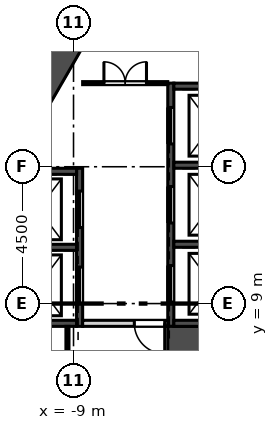
"""IFC4 building model, lengths in metres.
Left out: names, types, materials, properties, quantities, classifications, styles, units other than length and angle.
Written with IfcOpenShell. Run it as: python <this file> out.ifc"""

import sys

from ifc_helpers import new_model, si_unit, direction, frame, frame_2d, origin, place, context, subcontext, project, spatial, rectangle, extrude, element, fill, save


model = new_model("IFC4")
c1 = context("Model", 3, precision=1e-05, world=origin(), true_north=direction((0.0, 1.0)))
c2 = subcontext(c1, "Body", "Model", "MODEL_VIEW")
j1 = project(units=[si_unit("LENGTHUNIT", "METRE"), si_unit("PLANEANGLEUNIT", "RADIAN")], contexts=[c1])
p1 = place(None, origin())
s1 = spatial("IfcSite", under=j1, at=p1, CompositionType="ELEMENT")
p2 = place(p1, origin())
s2 = spatial("IfcBuilding", under=s1, at=p2, CompositionType="ELEMENT")
p3 = place(p2, frame((0.0, 0.0, 14.0)))
s3 = spatial("IfcBuildingStorey", under=s2, at=p3, CompositionType="ELEMENT", Elevation=14.0)
p4 = place(p3, frame((-8.805, 18.65, 0.0), z_axis=(0.0, 0.0, 1.0), x_axis=(-0.50000187635, -0.866024320471, 0.0)))
e1 = element("IfcWall", 1, at=p4, inside=s3, PredefinedType="SHEAR", context=c2, shape_type="SweptSolid", body=[
    extrude(rectangle(XDim=9.177, YDim=1.4, at=frame_2d((4.588, 0.0))), origin(), (0.0, 0.0, 1.0), 6.0),
])
p5 = place(p3, frame((-4.853, 74.393, 0.0), z_axis=(0.0, 0.0, 1.0), x_axis=(-0.49999894854, -0.866026010844, 0.0)))
e2 = element("IfcWall", 2, at=p5, inside=s3, PredefinedType="SOLIDWALL", context=c2, shape_type="SweptSolid", body=[
    extrude(rectangle(XDim=76.0, YDim=0.34, at=frame_2d((38.0, 0.0))), origin(), (0.0, 0.0, 1.0), 5.7),
])
p6 = place(p5, frame((1.058, 0.0, 0.9)))
e3 = element("IfcOpeningElement", 3, at=p6, cuts=e2, PredefinedType="OPENING", context=c2, shape_type="SweptSolid", body=[
    extrude(rectangle(XDim=1.885, YDim=3.5, at=frame_2d((0.942, 1.75))), frame((0.0, 0.18, 0.0), z_axis=(0.0, -1.0, 0.0), x_axis=(1.0, 0.0, 0.0)), (0.0, 0.0, 1.0), 0.36),
])
p7 = place(p5, frame((4.058, 0.0, 0.9)))
e4 = element("IfcOpeningElement", 4, at=p7, cuts=e2, PredefinedType="OPENING", context=c2, shape_type="SweptSolid", body=[
    extrude(rectangle(XDim=1.885, YDim=3.5, at=frame_2d((0.942, 1.75))), frame((0.0, 0.18, 0.0), z_axis=(0.0, -1.0, 0.0), x_axis=(1.0, 0.0, 0.0)), (0.0, 0.0, 1.0), 0.36),
])
p8 = place(p5, frame((7.058, 0.0, 0.9)))
e5 = element("IfcOpeningElement", 5, at=p8, cuts=e2, PredefinedType="OPENING", context=c2, shape_type="SweptSolid", body=[
    extrude(rectangle(XDim=1.885, YDim=3.5, at=frame_2d((0.942, 1.75))), frame((0.0, 0.18, 0.0), z_axis=(0.0, -1.0, 0.0), x_axis=(1.0, 0.0, 0.0)), (0.0, 0.0, 1.0), 0.36),
])
p9 = place(p5, frame((10.058, 0.0, 0.9)))
e6 = element("IfcOpeningElement", 6, at=p9, cuts=e2, PredefinedType="OPENING", context=c2, shape_type="SweptSolid", body=[
    extrude(rectangle(XDim=1.885, YDim=3.5, at=frame_2d((0.942, 1.75))), frame((0.0, 0.18, 0.0), z_axis=(0.0, -1.0, 0.0), x_axis=(1.0, 0.0, 0.0)), (0.0, 0.0, 1.0), 0.36),
])
p10 = place(p5, frame((13.058, 0.0, 0.9)))
e7 = element("IfcOpeningElement", 7, at=p10, cuts=e2, PredefinedType="OPENING", context=c2, shape_type="SweptSolid", body=[
    extrude(rectangle(XDim=1.885, YDim=3.5, at=frame_2d((0.942, 1.75))), frame((0.0, 0.18, 0.0), z_axis=(0.0, -1.0, 0.0), x_axis=(1.0, 0.0, 0.0)), (0.0, 0.0, 1.0), 0.36),
])
p11 = place(p5, frame((16.058, 0.0, 0.9)))
e8 = element("IfcOpeningElement", 8, at=p11, cuts=e2, PredefinedType="OPENING", context=c2, shape_type="SweptSolid", body=[
    extrude(rectangle(XDim=1.885, YDim=3.5, at=frame_2d((0.942, 1.75))), frame((0.0, 0.18, 0.0), z_axis=(0.0, -1.0, 0.0), x_axis=(1.0, 0.0, 0.0)), (0.0, 0.0, 1.0), 0.36),
])
p12 = place(p5, frame((19.058, 0.0, 0.9)))
e9 = element("IfcOpeningElement", 9, at=p12, cuts=e2, PredefinedType="OPENING", context=c2, shape_type="SweptSolid", body=[
    extrude(rectangle(XDim=1.885, YDim=3.5, at=frame_2d((0.942, 1.75))), frame((0.0, 0.18, 0.0), z_axis=(0.0, -1.0, 0.0), x_axis=(1.0, 0.0, 0.0)), (0.0, 0.0, 1.0), 0.36),
])
p13 = place(p5, frame((22.058, 0.0, 0.9)))
e10 = element("IfcOpeningElement", 10, at=p13, cuts=e2, PredefinedType="OPENING", context=c2, shape_type="SweptSolid", body=[
    extrude(rectangle(XDim=1.885, YDim=3.5, at=frame_2d((0.942, 1.75))), frame((0.0, 0.18, 0.0), z_axis=(0.0, -1.0, 0.0), x_axis=(1.0, 0.0, 0.0)), (0.0, 0.0, 1.0), 0.36),
])
p14 = place(p5, frame((25.058, 0.0, 0.9)))
e11 = element("IfcOpeningElement", 11, at=p14, cuts=e2, PredefinedType="OPENING", context=c2, shape_type="SweptSolid", body=[
    extrude(rectangle(XDim=1.885, YDim=3.5, at=frame_2d((0.942, 1.75))), frame((0.0, 0.18, 0.0), z_axis=(0.0, -1.0, 0.0), x_axis=(1.0, 0.0, 0.0)), (0.0, 0.0, 1.0), 0.36),
])
p15 = place(p5, frame((28.058, 0.0, 0.9)))
e12 = element("IfcOpeningElement", 12, at=p15, cuts=e2, PredefinedType="OPENING", context=c2, shape_type="SweptSolid", body=[
    extrude(rectangle(XDim=1.885, YDim=3.5, at=frame_2d((0.942, 1.75))), frame((0.0, 0.18, 0.0), z_axis=(0.0, -1.0, 0.0), x_axis=(1.0, 0.0, 0.0)), (0.0, 0.0, 1.0), 0.36),
])
p16 = place(p5, frame((31.058, 0.0, 0.9)))
e13 = element("IfcOpeningElement", 13, at=p16, cuts=e2, PredefinedType="OPENING", context=c2, shape_type="SweptSolid", body=[
    extrude(rectangle(XDim=1.885, YDim=3.5, at=frame_2d((0.942, 1.75))), frame((0.0, 0.18, 0.0), z_axis=(0.0, -1.0, 0.0), x_axis=(1.0, 0.0, 0.0)), (0.0, 0.0, 1.0), 0.36),
])
p17 = place(p5, frame((34.058, 0.0, 0.9)))
e14 = element("IfcOpeningElement", 14, at=p17, cuts=e2, PredefinedType="OPENING", context=c2, shape_type="SweptSolid", body=[
    extrude(rectangle(XDim=1.885, YDim=3.5, at=frame_2d((0.942, 1.75))), frame((0.0, 0.18, 0.0), z_axis=(0.0, -1.0, 0.0), x_axis=(1.0, 0.0, 0.0)), (0.0, 0.0, 1.0), 0.36),
])
p18 = place(p5, frame((37.058, 0.0, 0.9)))
e15 = element("IfcOpeningElement", 15, at=p18, cuts=e2, PredefinedType="OPENING", context=c2, shape_type="SweptSolid", body=[
    extrude(rectangle(XDim=1.885, YDim=3.5, at=frame_2d((0.942, 1.75))), frame((0.0, 0.18, 0.0), z_axis=(0.0, -1.0, 0.0), x_axis=(1.0, 0.0, 0.0)), (0.0, 0.0, 1.0), 0.36),
])
p19 = place(p5, frame((40.058, 0.0, 0.9)))
e16 = element("IfcOpeningElement", 16, at=p19, cuts=e2, PredefinedType="OPENING", context=c2, shape_type="SweptSolid", body=[
    extrude(rectangle(XDim=1.885, YDim=3.5, at=frame_2d((0.942, 1.75))), frame((0.0, 0.18, 0.0), z_axis=(0.0, -1.0, 0.0), x_axis=(1.0, 0.0, 0.0)), (0.0, 0.0, 1.0), 0.36),
])
p20 = place(p5, frame((43.058, 0.0, 0.9)))
e17 = element("IfcOpeningElement", 17, at=p20, cuts=e2, PredefinedType="OPENING", context=c2, shape_type="SweptSolid", body=[
    extrude(rectangle(XDim=1.885, YDim=3.5, at=frame_2d((0.942, 1.75))), frame((0.0, 0.18, 0.0), z_axis=(0.0, -1.0, 0.0), x_axis=(1.0, 0.0, 0.0)), (0.0, 0.0, 1.0), 0.36),
])
p21 = place(p5, frame((46.058, 0.0, 0.9)))
e18 = element("IfcOpeningElement", 18, at=p21, cuts=e2, PredefinedType="OPENING", context=c2, shape_type="SweptSolid", body=[
    extrude(rectangle(XDim=1.885, YDim=3.5, at=frame_2d((0.942, 1.75))), frame((0.0, 0.18, 0.0), z_axis=(0.0, -1.0, 0.0), x_axis=(1.0, 0.0, 0.0)), (0.0, 0.0, 1.0), 0.36),
])
p22 = place(p5, frame((49.058, 0.0, 0.9)))
e19 = element("IfcOpeningElement", 19, at=p22, cuts=e2, PredefinedType="OPENING", context=c2, shape_type="SweptSolid", body=[
    extrude(rectangle(XDim=1.885, YDim=3.5, at=frame_2d((0.942, 1.75))), frame((0.0, 0.18, 0.0), z_axis=(0.0, -1.0, 0.0), x_axis=(1.0, 0.0, 0.0)), (0.0, 0.0, 1.0), 0.36),
])
p23 = place(p5, frame((52.058, 0.0, 0.9)))
e20 = element("IfcOpeningElement", 20, at=p23, cuts=e2, PredefinedType="OPENING", context=c2, shape_type="SweptSolid", body=[
    extrude(rectangle(XDim=1.885, YDim=3.5, at=frame_2d((0.942, 1.75))), frame((0.0, 0.18, 0.0), z_axis=(0.0, -1.0, 0.0), x_axis=(1.0, 0.0, 0.0)), (0.0, 0.0, 1.0), 0.36),
])
p24 = place(p5, frame((55.058, 0.0, 0.9)))
e21 = element("IfcOpeningElement", 21, at=p24, cuts=e2, PredefinedType="OPENING", context=c2, shape_type="SweptSolid", body=[
    extrude(rectangle(XDim=1.885, YDim=3.5, at=frame_2d((0.942, 1.75))), frame((0.0, 0.18, 0.0), z_axis=(0.0, -1.0, 0.0), x_axis=(1.0, 0.0, 0.0)), (0.0, 0.0, 1.0), 0.36),
])
p25 = place(p5, frame((58.058, 0.0, 0.9)))
e22 = element("IfcOpeningElement", 22, at=p25, cuts=e2, PredefinedType="OPENING", context=c2, shape_type="SweptSolid", body=[
    extrude(rectangle(XDim=1.885, YDim=3.5, at=frame_2d((0.942, 1.75))), frame((0.0, 0.18, 0.0), z_axis=(0.0, -1.0, 0.0), x_axis=(1.0, 0.0, 0.0)), (0.0, 0.0, 1.0), 0.36),
])
p26 = place(p5, frame((61.058, 0.0, 0.9)))
e23 = element("IfcOpeningElement", 23, at=p26, cuts=e2, PredefinedType="OPENING", context=c2, shape_type="SweptSolid", body=[
    extrude(rectangle(XDim=1.885, YDim=3.5, at=frame_2d((0.942, 1.75))), frame((0.0, 0.18, 0.0), z_axis=(0.0, -1.0, 0.0), x_axis=(1.0, 0.0, 0.0)), (0.0, 0.0, 1.0), 0.36),
])
p27 = place(p5, frame((64.058, 0.0, 0.9)))
e24 = element("IfcOpeningElement", 24, at=p27, cuts=e2, PredefinedType="OPENING", context=c2, shape_type="SweptSolid", body=[
    extrude(rectangle(XDim=1.885, YDim=3.5, at=frame_2d((0.942, 1.75))), frame((0.0, 0.18, 0.0), z_axis=(0.0, -1.0, 0.0), x_axis=(1.0, 0.0, 0.0)), (0.0, 0.0, 1.0), 0.36),
])
p28 = place(p5, frame((67.058, 0.0, 0.9)))
e25 = element("IfcOpeningElement", 25, at=p28, cuts=e2, PredefinedType="OPENING", context=c2, shape_type="SweptSolid", body=[
    extrude(rectangle(XDim=1.885, YDim=3.5, at=frame_2d((0.942, 1.75))), frame((0.0, 0.18, 0.0), z_axis=(0.0, -1.0, 0.0), x_axis=(1.0, 0.0, 0.0)), (0.0, 0.0, 1.0), 0.36),
])
p29 = place(p5, frame((70.058, 0.0, 0.9)))
e26 = element("IfcOpeningElement", 26, at=p29, cuts=e2, PredefinedType="OPENING", context=c2, shape_type="SweptSolid", body=[
    extrude(rectangle(XDim=1.885, YDim=3.5, at=frame_2d((0.942, 1.75))), frame((0.0, 0.18, 0.0), z_axis=(0.0, -1.0, 0.0), x_axis=(1.0, 0.0, 0.0)), (0.0, 0.0, 1.0), 0.36),
])
p30 = place(p5, frame((73.058, 0.0, 0.9)))
e27 = element("IfcOpeningElement", 27, at=p30, cuts=e2, PredefinedType="OPENING", context=c2, shape_type="SweptSolid", body=[
    extrude(rectangle(XDim=1.885, YDim=3.5, at=frame_2d((0.942, 1.75))), frame((0.0, 0.18, 0.0), z_axis=(0.0, -1.0, 0.0), x_axis=(1.0, 0.0, 0.0)), (0.0, 0.0, 1.0), 0.36),
])
p31 = place(p3, frame((-8.8, 8.25, -0.3), z_axis=(0.0, 0.0, 1.0), x_axis=(0.0, 1.0, 0.0)))
e28 = element("IfcWall", 28, at=p31, inside=s3, PredefinedType="SOLIDWALL", context=c2, shape_type="SweptSolid", body=[
    extrude(rectangle(XDim=5.2, YDim=0.2, at=frame_2d((2.6, 0.0))), origin(), (0.0, 0.0, 1.0), 6.0),
])
p32 = place(p31, frame((0.75, 0.0, 0.3)))
e29 = element("IfcOpeningElement", 29, at=p32, cuts=e28, PredefinedType="OPENING", context=c2, shape_type="SweptSolid", body=[
    extrude(rectangle(XDim=1.2, YDim=2.1, at=frame_2d((0.6, 1.05))), frame((0.0, 0.11, 0.0), z_axis=(0.0, -1.0, 0.0), x_axis=(1.0, 0.0, 0.0)), (0.0, 0.0, 1.0), 0.22),
])
p33 = place(p31, frame((3.25, 0.0, 0.3)))
e30 = element("IfcOpeningElement", 30, at=p33, cuts=e28, PredefinedType="OPENING", context=c2, shape_type="SweptSolid", body=[
    extrude(rectangle(XDim=1.2, YDim=2.1, at=frame_2d((0.6, 1.05))), frame((0.0, 0.11, 0.0), z_axis=(0.0, -1.0, 0.0), x_axis=(1.0, 0.0, 0.0)), (0.0, 0.0, 1.0), 0.22),
])
p34 = place(p3, frame((-5.8, 8.25, -0.3), z_axis=(0.0, 0.0, 1.0), x_axis=(0.0, 1.0, 0.0)))
e31 = element("IfcWall", 31, at=p34, inside=s3, PredefinedType="SOLIDWALL", context=c2, shape_type="SweptSolid", body=[
    extrude(rectangle(XDim=8.0, YDim=0.2, at=frame_2d((4.0, 0.0))), origin(), (0.0, 0.0, 1.0), 6.0),
])
p35 = place(p34, frame((0.8, 0.0, 0.3)))
e32 = element("IfcOpeningElement", 32, at=p35, cuts=e31, PredefinedType="OPENING", context=c2, shape_type="SweptSolid", body=[
    extrude(rectangle(XDim=1.2, YDim=2.1, at=frame_2d((0.6, 1.05))), frame((0.0, 0.11, 0.0), z_axis=(0.0, -1.0, 0.0), x_axis=(1.0, 0.0, 0.0)), (0.0, 0.0, 1.0), 0.22),
])
p36 = place(p34, frame((3.4, 0.0, 0.3)))
e33 = element("IfcOpeningElement", 33, at=p36, cuts=e31, PredefinedType="OPENING", context=c2, shape_type="SweptSolid", body=[
    extrude(rectangle(XDim=1.2, YDim=2.1, at=frame_2d((0.6, 1.05))), frame((0.0, 0.11, 0.0), z_axis=(0.0, -1.0, 0.0), x_axis=(1.0, 0.0, 0.0)), (0.0, 0.0, 1.0), 0.22),
])
p37 = place(p34, frame((6.0, 0.0, 0.3)))
e34 = element("IfcOpeningElement", 34, at=p37, cuts=e31, PredefinedType="OPENING", context=c2, shape_type="SweptSolid", body=[
    extrude(rectangle(XDim=1.2, YDim=2.1, at=frame_2d((0.6, 1.05))), frame((0.0, 0.11, 0.0), z_axis=(0.0, -1.0, 0.0), x_axis=(1.0, 0.0, 0.0)), (0.0, 0.0, 1.0), 0.22),
])
p38 = place(p3, frame((-5.2, 5.85, -0.3), z_axis=(0.0, 0.0, 1.0), x_axis=(0.0, 1.0, 0.0)))
e35 = element("IfcWall", 35, at=p38, inside=s3, PredefinedType="SOLIDWALL", context=c2, shape_type="SweptSolid", body=[
    extrude(rectangle(XDim=2.4, YDim=1.4, at=frame_2d((1.2, 0.0))), origin(), (0.0, 0.0, 1.0), 6.0),
])
p39 = place(p3, frame((-10.9, 8.35, -0.3), z_axis=(0.0, 0.0, 1.0), x_axis=(1.0, 0.0, 0.0)))
e36 = element("IfcWall", 36, at=p39, inside=s3, PredefinedType="SOLIDWALL", context=c2, shape_type="SweptSolid", body=[
    extrude(rectangle(XDim=2.0, YDim=0.2, at=frame_2d((1.0, 0.0))), origin(), (0.0, 0.0, 1.0), 6.0),
])
p40 = place(p3, frame((-5.7, 8.35, -0.3), z_axis=(0.0, 0.0, 1.0), x_axis=(1.0, 0.0, 0.0)))
e37 = element("IfcWall", 37, at=p40, inside=s3, PredefinedType="SOLIDWALL", context=c2, shape_type="SweptSolid", body=[
    extrude(rectangle(XDim=4.2, YDim=0.2, at=frame_2d((2.1, 0.0))), origin(), (0.0, 0.0, 1.0), 6.0),
])
for number, where, z_axis, x_axis in (
    (38, (-10.9, 10.85, -0.3), (0.0, 0.0, 1.0), (1.0, 0.0, 0.0)),
    (39, (-10.9, 13.35, -0.3), (0.0, 0.0, 1.0), (1.0, 0.0, 0.0)),
    (40, (-5.7, 10.95, -0.3), (0.0, 0.0, 1.0), (1.0, 0.0, 0.0)),
    (41, (-5.7, 13.55, -0.3), (0.0, 0.0, 1.0), (1.0, 0.0, 0.0)),
    (42, (-5.7, 16.15, -0.3), (0.0, 0.0, 1.0), (1.0, 0.0, 0.0)),
):
    element("IfcWall", number, at=place(p3, frame(where, z_axis=z_axis, x_axis=x_axis)), inside=s3, PredefinedType="SOLIDWALL", context=c2, shape_type="SweptSolid", body=[
        extrude(rectangle(XDim=2.0, YDim=0.2, at=frame_2d((1.0, 0.0))), origin(), (0.0, 0.0, 1.0), 6.0),
    ])
p41 = place(p3, frame((-8.7, 16.25, 0.0), z_axis=(0.0, 0.0, 1.0), x_axis=(1.0, 0.0, 0.0)))
e43 = element("IfcWall", 43, at=p41, inside=s3, PredefinedType="PARTITIONING", context=c2, shape_type="SweptSolid", body=[
    extrude(rectangle(XDim=2.8, YDim=0.1, at=frame_2d((1.4, 0.0))), origin(), (0.0, 0.0, 1.0), 5.7),
])
p42 = place(p41, frame((0.7, 0.0, 0.0)))
e44 = element("IfcOpeningElement", 44, at=p42, cuts=e43, PredefinedType="OPENING", context=c2, shape_type="SweptSolid", body=[
    extrude(rectangle(XDim=1.4, YDim=2.1, at=frame_2d((0.7, 1.05))), frame((0.0, 0.06, 0.0), z_axis=(0.0, -1.0, 0.0), x_axis=(1.0, 0.0, 0.0)), (0.0, 0.0, 1.0), 0.12),
])
p43 = place(p3, frame((-9.2, 5.85, 0.0), z_axis=(0.0, 0.0, 1.0), x_axis=(0.0, 1.0, 0.0)))
e45 = element("IfcWall", 45, at=p43, inside=s3, PredefinedType="PARTITIONING", context=c2, shape_type="SweptSolid", body=[
    extrude(rectangle(XDim=2.4, YDim=0.1, at=frame_2d((1.2, 0.0))), origin(), (0.0, 0.0, 1.0), 5.7),
])
p44 = place(p43, frame((0.7, 0.0, 0.0)))
e46 = element("IfcOpeningElement", 46, at=p44, cuts=e45, PredefinedType="OPENING", context=c2, shape_type="SweptSolid", body=[
    extrude(rectangle(XDim=0.9, YDim=2.1, at=frame_2d((0.45, 1.05))), frame((0.0, 0.06, 0.0), z_axis=(0.0, -1.0, 0.0), x_axis=(1.0, 0.0, 0.0)), (0.0, 0.0, 1.0), 0.12),
])
p45 = place(p3, frame((-8.7, 8.35, 0.0), z_axis=(0.0, 0.0, 1.0), x_axis=(1.0, 0.0, 0.0)))
e47 = element("IfcWall", 47, at=p45, inside=s3, PredefinedType="SOLIDWALL", context=c2, shape_type="SweptSolid", body=[
    extrude(rectangle(XDim=2.8, YDim=0.2, at=frame_2d((1.4, 0.0))), origin(), (0.0, 0.0, 1.0), 5.7),
])
p46 = place(p45, frame((1.7, 0.0, 0.0)))
e48 = element("IfcOpeningElement", 48, at=p46, cuts=e47, PredefinedType="OPENING", context=c2, shape_type="SweptSolid", body=[
    extrude(rectangle(XDim=1.0, YDim=2.1, at=frame_2d((0.5, 1.05))), frame((0.0, 0.11, 0.0), z_axis=(0.0, -1.0, 0.0), x_axis=(1.0, 0.0, 0.0)), (0.0, 0.0, 1.0), 0.22),
])
p47 = place(p32, origin())
e49 = element("IfcDoor", 49, at=p47, inside=s3, OperationType="SLIDING_TO_LEFT", PredefinedType="DOOR", context=c2, shape_type="SweptSolid", body=[
    extrude(rectangle(XDim=1.2, YDim=2.1, at=frame_2d((0.6, 1.05))), frame((0.0, 0.025, 0.0), z_axis=(0.0, -1.0, 0.0), x_axis=(1.0, 0.0, 0.0)), (0.0, 0.0, 1.0), 0.05),
])
fill(e29, e49)
p48 = place(p33, origin())
e50 = element("IfcDoor", 50, at=p48, inside=s3, OperationType="SLIDING_TO_LEFT", PredefinedType="DOOR", context=c2, shape_type="SweptSolid", body=[
    extrude(rectangle(XDim=1.2, YDim=2.1, at=frame_2d((0.6, 1.05))), frame((0.0, 0.025, 0.0), z_axis=(0.0, -1.0, 0.0), x_axis=(1.0, 0.0, 0.0)), (0.0, 0.0, 1.0), 0.05),
])
fill(e30, e50)
p49 = place(p35, origin())
e51 = element("IfcDoor", 51, at=p49, inside=s3, OperationType="SLIDING_TO_LEFT", PredefinedType="DOOR", context=c2, shape_type="SweptSolid", body=[
    extrude(rectangle(XDim=1.2, YDim=2.1, at=frame_2d((0.6, 1.05))), frame((0.0, 0.025, 0.0), z_axis=(0.0, -1.0, 0.0), x_axis=(1.0, 0.0, 0.0)), (0.0, 0.0, 1.0), 0.05),
])
fill(e32, e51)
p50 = place(p36, origin())
e52 = element("IfcDoor", 52, at=p50, inside=s3, OperationType="SLIDING_TO_LEFT", PredefinedType="DOOR", context=c2, shape_type="SweptSolid", body=[
    extrude(rectangle(XDim=1.2, YDim=2.1, at=frame_2d((0.6, 1.05))), frame((0.0, 0.025, 0.0), z_axis=(0.0, -1.0, 0.0), x_axis=(1.0, 0.0, 0.0)), (0.0, 0.0, 1.0), 0.05),
])
fill(e33, e52)
p51 = place(p37, origin())
e53 = element("IfcDoor", 53, at=p51, inside=s3, OperationType="SLIDING_TO_LEFT", PredefinedType="DOOR", context=c2, shape_type="SweptSolid", body=[
    extrude(rectangle(XDim=1.2, YDim=2.1, at=frame_2d((0.6, 1.05))), frame((0.0, 0.025, 0.0), z_axis=(0.0, -1.0, 0.0), x_axis=(1.0, 0.0, 0.0)), (0.0, 0.0, 1.0), 0.05),
])
fill(e34, e53)
p52 = place(p42, origin())
e54 = element("IfcDoor", 54, at=p52, inside=s3, OperationType="DOUBLE_DOOR_SINGLE_SWING", PredefinedType="DOOR", context=c2, shape_type="SweptSolid", body=[
    extrude(rectangle(XDim=1.4, YDim=2.1, at=frame_2d((0.7, 1.05))), frame((0.0, 0.025, 0.0), z_axis=(0.0, -1.0, 0.0), x_axis=(1.0, 0.0, 0.0)), (0.0, 0.0, 1.0), 0.05),
])
fill(e44, e54)
p53 = place(p46, frame((1.0, 0.0, 0.0), z_axis=(0.0, 0.0, 1.0), x_axis=(-1.0, 0.0, 0.0)))
e55 = element("IfcDoor", 55, at=p53, inside=s3, OperationType="SINGLE_SWING_LEFT", PredefinedType="DOOR", context=c2, shape_type="SweptSolid", body=[
    extrude(rectangle(XDim=1.0, YDim=2.1, at=frame_2d((0.5, 1.05))), frame((0.0, 0.025, 0.0), z_axis=(0.0, -1.0, 0.0), x_axis=(1.0, 0.0, 0.0)), (0.0, 0.0, 1.0), 0.05),
])
fill(e48, e55)
save(model, sys.argv[1])
